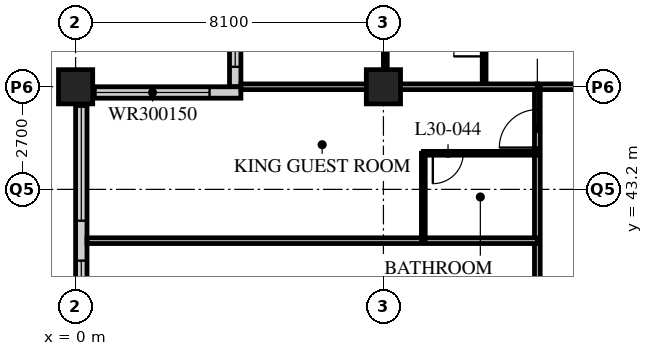
"""IFC4 building model, lengths in metres.
Left out: names, types, materials, properties, quantities, classifications, styles, units other than length and angle.
Written with IfcOpenShell. Run it as: python <this file> out.ifc"""

import sys

from ifc_helpers import new_model, si_unit, direction, frame, frame_2d, origin, origin_2d, place, context, subcontext, project, spatial, rectangle, hollow_rectangle, extrude, element, fill, save


model = new_model("IFC4")
c1 = context("Model", 3, precision=1e-05, world=origin(), true_north=direction((0.0, 1.0)))
c2 = subcontext(c1, "Body", "Model", "MODEL_VIEW")
j1 = project(units=[si_unit("LENGTHUNIT", "METRE"), si_unit("PLANEANGLEUNIT", "RADIAN")], contexts=[c1])
p1 = place(None, origin())
s1 = spatial("IfcSite", under=j1, at=p1, CompositionType="ELEMENT")
p2 = place(p1, origin())
s2 = spatial("IfcBuilding", under=s1, at=p2, CompositionType="ELEMENT")
p3 = place(p2, frame((0.0, 0.0, 120.4)))
s3 = spatial("IfcBuildingStorey", under=s2, at=p3, CompositionType="ELEMENT", Elevation=120.4)
for number, where, z_axis, x_axis in (
    (1, (0.0, 45.9, 0.0), (0.0, 0.0, 1.0), (1.0, 0.0, 0.0)),
    (2, (8.1, 45.9, 0.0), (0.0, 0.0, 1.0), (1.0, 0.0, 0.0)),
):
    element("IfcColumn", number, at=place(p3, frame(where, z_axis=z_axis, x_axis=x_axis)), inside=s3, PredefinedType="COLUMN", context=c2, shape_type="SweptSolid", body=[
        extrude(hollow_rectangle(XDim=0.9, YDim=0.9, WallThickness=0.09, at=origin_2d()), origin(), (0.0, 0.0, 1.0), 3.4),
    ])
p4 = place(p3, frame((4.2, 49.65, 0.0), z_axis=(0.0, 0.0, 1.0), x_axis=(0.0, -1.0, 0.0)))
e3 = element("IfcWall", 3, at=p4, inside=s3, PredefinedType="SOLIDWALL", context=c2, shape_type="SweptSolid", body=[
    extrude(rectangle(XDim=3.75, YDim=0.3, at=frame_2d((1.875, 0.0))), origin(), (0.0, 0.0, 1.0), 3.19),
])
p5 = place(p4, frame((0.225, 0.0, 0.9)))
e4 = element("IfcOpeningElement", 4, at=p5, cuts=e3, PredefinedType="OPENING", context=c2, shape_type="SweptSolid", body=[
    extrude(rectangle(XDim=3.0, YDim=1.5, at=frame_2d((1.5, 0.75))), frame((0.0, 0.16, 0.0), z_axis=(0.0, -1.0, 0.0), x_axis=(1.0, 0.0, 0.0)), (0.0, 0.0, 1.0), 0.32),
])
p6 = place(p3, frame((4.35, 45.75, 0.0), z_axis=(0.0, 0.0, 1.0), x_axis=(-1.0, 0.0, 0.0)))
e5 = element("IfcWall", 5, at=p6, inside=s3, PredefinedType="SOLIDWALL", context=c2, shape_type="SweptSolid", body=[
    extrude(rectangle(XDim=4.35, YDim=0.3, at=frame_2d((2.175, 0.0))), origin(), (0.0, 0.0, 1.0), 3.19),
])
p7 = place(p6, frame((0.825, 0.0, 0.9)))
e6 = element("IfcOpeningElement", 6, at=p7, cuts=e5, PredefinedType="OPENING", context=c2, shape_type="SweptSolid", body=[
    extrude(rectangle(XDim=3.0, YDim=1.5, at=frame_2d((1.5, 0.75))), frame((0.0, 0.16, 0.0), z_axis=(0.0, -1.0, 0.0), x_axis=(1.0, 0.0, 0.0)), (0.0, 0.0, 1.0), 0.32),
])
p8 = place(p3, frame((0.15, 45.6, 0.0), z_axis=(0.0, 0.0, 1.0), x_axis=(0.0, -1.0, 0.0)))
e7 = element("IfcWall", 7, at=p8, inside=s3, PredefinedType="SOLIDWALL", context=c2, shape_type="SweptSolid", body=[
    extrude(rectangle(XDim=32.1, YDim=0.3, at=frame_2d((16.05, 0.0))), origin(), (0.0, 0.0, 1.0), 3.19),
])
p9 = place(p8, frame((0.225, 0.0, 0.9)))
e8 = element("IfcOpeningElement", 8, at=p9, cuts=e7, PredefinedType="OPENING", context=c2, shape_type="SweptSolid", body=[
    extrude(rectangle(XDim=3.0, YDim=2.0, at=frame_2d((1.5, 1.0))), frame((0.0, 0.16, 0.0), z_axis=(0.0, -1.0, 0.0), x_axis=(1.0, 0.0, 0.0)), (0.0, 0.0, 1.0), 0.32),
])
p10 = place(p8, frame((4.275, 0.0, 0.9)))
e9 = element("IfcOpeningElement", 9, at=p10, cuts=e7, PredefinedType="OPENING", context=c2, shape_type="SweptSolid", body=[
    extrude(rectangle(XDim=3.0, YDim=2.0, at=frame_2d((1.5, 1.0))), frame((0.0, 0.16, 0.0), z_axis=(0.0, -1.0, 0.0), x_axis=(1.0, 0.0, 0.0)), (0.0, 0.0, 1.0), 0.32),
])
p11 = place(p8, frame((8.325, 0.0, 0.9)))
e10 = element("IfcOpeningElement", 10, at=p11, cuts=e7, PredefinedType="OPENING", context=c2, shape_type="SweptSolid", body=[
    extrude(rectangle(XDim=3.0, YDim=2.0, at=frame_2d((1.5, 1.0))), frame((0.0, 0.16, 0.0), z_axis=(0.0, -1.0, 0.0), x_axis=(1.0, 0.0, 0.0)), (0.0, 0.0, 1.0), 0.32),
])
p12 = place(p8, frame((12.375, 0.0, 0.9)))
e11 = element("IfcOpeningElement", 11, at=p12, cuts=e7, PredefinedType="OPENING", context=c2, shape_type="SweptSolid", body=[
    extrude(rectangle(XDim=3.0, YDim=2.0, at=frame_2d((1.5, 1.0))), frame((0.0, 0.16, 0.0), z_axis=(0.0, -1.0, 0.0), x_axis=(1.0, 0.0, 0.0)), (0.0, 0.0, 1.0), 0.32),
])
p13 = place(p8, frame((16.425, 0.0, 0.9)))
e12 = element("IfcOpeningElement", 12, at=p13, cuts=e7, PredefinedType="OPENING", context=c2, shape_type="SweptSolid", body=[
    extrude(rectangle(XDim=3.0, YDim=2.0, at=frame_2d((1.5, 1.0))), frame((0.0, 0.16, 0.0), z_axis=(0.0, -1.0, 0.0), x_axis=(1.0, 0.0, 0.0)), (0.0, 0.0, 1.0), 0.32),
])
p14 = place(p8, frame((20.475, 0.0, 0.9)))
e13 = element("IfcOpeningElement", 13, at=p14, cuts=e7, PredefinedType="OPENING", context=c2, shape_type="SweptSolid", body=[
    extrude(rectangle(XDim=3.0, YDim=2.0, at=frame_2d((1.5, 1.0))), frame((0.0, 0.16, 0.0), z_axis=(0.0, -1.0, 0.0), x_axis=(1.0, 0.0, 0.0)), (0.0, 0.0, 1.0), 0.32),
])
p15 = place(p8, frame((24.525, 0.0, 0.9)))
e14 = element("IfcOpeningElement", 14, at=p15, cuts=e7, PredefinedType="OPENING", context=c2, shape_type="SweptSolid", body=[
    extrude(rectangle(XDim=3.0, YDim=2.0, at=frame_2d((1.5, 1.0))), frame((0.0, 0.16, 0.0), z_axis=(0.0, -1.0, 0.0), x_axis=(1.0, 0.0, 0.0)), (0.0, 0.0, 1.0), 0.32),
])
p16 = place(p8, frame((28.575, 0.0, 0.9)))
e15 = element("IfcOpeningElement", 15, at=p16, cuts=e7, PredefinedType="OPENING", context=c2, shape_type="SweptSolid", body=[
    extrude(rectangle(XDim=3.0, YDim=2.0, at=frame_2d((1.5, 1.0))), frame((0.0, 0.16, 0.0), z_axis=(0.0, -1.0, 0.0), x_axis=(1.0, 0.0, 0.0)), (0.0, 0.0, 1.0), 0.32),
])
p17 = place(p3, frame((12.15, 45.9, 0.0), z_axis=(0.0, 0.0, 1.0), x_axis=(1.0, 0.0, 0.0)))
e16 = element("IfcWall", 16, at=p17, inside=s3, PredefinedType="PARTITIONING", context=c2, shape_type="SweptSolid", body=[
    extrude(rectangle(XDim=32.4, YDim=0.15, at=frame_2d((16.2, 0.0))), origin(), (0.0, 0.0, 1.0), 2.578),
])
p18 = place(p17, frame((5.95, 0.0, 0.0)))
e17 = element("IfcOpeningElement", 17, at=p18, cuts=e16, PredefinedType="OPENING", context=c2, shape_type="SweptSolid", body=[
    extrude(rectangle(XDim=1.0, YDim=2.1, at=frame_2d((0.5, 1.05))), frame((0.0, 0.085, 0.0), z_axis=(0.0, -1.0, 0.0), x_axis=(1.0, 0.0, 0.0)), (0.0, 0.0, 1.0), 0.17),
])
p19 = place(p17, frame((14.05, 0.0, 0.0)))
e18 = element("IfcOpeningElement", 18, at=p19, cuts=e16, PredefinedType="OPENING", context=c2, shape_type="SweptSolid", body=[
    extrude(rectangle(XDim=1.0, YDim=2.1, at=frame_2d((0.5, 1.05))), frame((0.0, 0.085, 0.0), z_axis=(0.0, -1.0, 0.0), x_axis=(1.0, 0.0, 0.0)), (0.0, 0.0, 1.0), 0.17),
])
p20 = place(p17, frame((25.7, 0.0, 0.0)))
e19 = element("IfcOpeningElement", 19, at=p20, cuts=e16, PredefinedType="OPENING", context=c2, shape_type="SweptSolid", body=[
    extrude(rectangle(XDim=1.0, YDim=2.1, at=frame_2d((0.5, 1.05))), frame((0.0, 0.085, 0.0), z_axis=(0.0, -1.0, 0.0), x_axis=(1.0, 0.0, 0.0)), (0.0, 0.0, 1.0), 0.17),
])
p21 = place(p17, frame((29.875, 0.0, 0.0)))
e20 = element("IfcOpeningElement", 20, at=p21, cuts=e16, PredefinedType="OPENING", context=c2, shape_type="SweptSolid", body=[
    extrude(rectangle(XDim=1.0, YDim=2.1, at=frame_2d((0.5, 1.05))), frame((0.0, 0.085, 0.0), z_axis=(0.0, -1.0, 0.0), x_axis=(1.0, 0.0, 0.0)), (0.0, 0.0, 1.0), 0.17),
])
p22 = place(p17, frame((1.525, 0.0, 0.0)))
e21 = element("IfcOpeningElement", 21, at=p22, cuts=e16, PredefinedType="OPENING", context=c2, shape_type="SweptSolid", body=[
    extrude(rectangle(XDim=1.0, YDim=2.1, at=frame_2d((0.5, 1.05))), frame((0.0, 0.085, 0.0), z_axis=(0.0, -1.0, 0.0), x_axis=(1.0, 0.0, 0.0)), (0.0, 0.0, 1.0), 0.17),
])
p23 = place(p3, frame((12.15, 17.55, 0.0), z_axis=(0.0, 0.0, 1.0), x_axis=(0.0, 1.0, 0.0)))
e22 = element("IfcWall", 22, at=p23, inside=s3, PredefinedType="PARTITIONING", context=c2, shape_type="SweptSolid", body=[
    extrude(rectangle(XDim=28.35, YDim=0.15, at=frame_2d((14.175, 0.0))), origin(), (0.0, 0.0, 1.0), 3.19),
])
p24 = place(p23, frame((5.45, 0.0, 0.0)))
e23 = element("IfcOpeningElement", 23, at=p24, cuts=e22, PredefinedType="OPENING", context=c2, shape_type="SweptSolid", body=[
    extrude(rectangle(XDim=1.0, YDim=2.1, at=frame_2d((0.5, 1.05))), frame((0.0, 0.085, 0.0), z_axis=(0.0, -1.0, 0.0), x_axis=(1.0, 0.0, 0.0)), (0.0, 0.0, 1.0), 0.17),
])
p25 = place(p23, frame((13.55, 0.0, 0.0)))
e24 = element("IfcOpeningElement", 24, at=p25, cuts=e22, PredefinedType="OPENING", context=c2, shape_type="SweptSolid", body=[
    extrude(rectangle(XDim=1.0, YDim=2.1, at=frame_2d((0.5, 1.05))), frame((0.0, 0.085, 0.0), z_axis=(0.0, -1.0, 0.0), x_axis=(1.0, 0.0, 0.0)), (0.0, 0.0, 1.0), 0.17),
])
p26 = place(p23, frame((21.65, 0.0, 0.0)))
e25 = element("IfcOpeningElement", 25, at=p26, cuts=e22, PredefinedType="OPENING", context=c2, shape_type="SweptSolid", body=[
    extrude(rectangle(XDim=1.0, YDim=2.1, at=frame_2d((0.5, 1.05))), frame((0.0, 0.085, 0.0), z_axis=(0.0, -1.0, 0.0), x_axis=(1.0, 0.0, 0.0)), (0.0, 0.0, 1.0), 0.17),
])
p27 = place(p23, frame((26.75, 0.0, 0.0)))
e26 = element("IfcOpeningElement", 26, at=p27, cuts=e22, PredefinedType="OPENING", context=c2, shape_type="SweptSolid", body=[
    extrude(rectangle(XDim=1.0, YDim=2.1, at=frame_2d((0.5, 1.05))), frame((0.0, 0.085, 0.0), z_axis=(0.0, -1.0, 0.0), x_axis=(1.0, 0.0, 0.0)), (0.0, 0.0, 1.0), 0.17),
])
p28 = place(p3, frame((12.15, 41.85, 0.0), z_axis=(0.0, 0.0, 1.0), x_axis=(-1.0, 0.0, 0.0)))
e27 = element("IfcWall", 27, at=p28, inside=s3, PredefinedType="PARTITIONING", context=c2, shape_type="SweptSolid", body=[
    extrude(rectangle(XDim=11.85, YDim=0.15, at=frame_2d((5.925, 0.0))), origin(), (0.0, 0.0, 1.0), 3.19),
])
p29 = place(p3, frame((9.15, 41.85, 0.0), z_axis=(0.0, 0.0, 1.0), x_axis=(0.0, 1.0, 0.0)))
e28 = element("IfcWall", 28, at=p29, inside=s3, PredefinedType="PARTITIONING", context=c2, shape_type="SweptSolid", body=[
    extrude(rectangle(XDim=2.3, YDim=0.1, at=frame_2d((1.15, 0.0))), origin(), (0.0, 0.0, 1.0), 3.19),
])
p30 = place(p3, frame((12.15, 44.15, 0.0), z_axis=(0.0, 0.0, 1.0), x_axis=(-1.0, 0.0, 0.0)))
e29 = element("IfcWall", 29, at=p30, inside=s3, PredefinedType="PARTITIONING", context=c2, shape_type="SweptSolid", body=[
    extrude(rectangle(XDim=3.0, YDim=0.1, at=frame_2d((1.5, 0.0))), origin(), (0.0, 0.0, 1.0), 3.19),
])
p31 = place(p30, frame((1.95, 0.0, 0.0)))
e30 = element("IfcOpeningElement", 30, at=p31, cuts=e29, PredefinedType="OPENING", context=c2, shape_type="SweptSolid", body=[
    extrude(rectangle(XDim=0.8, YDim=2.1, at=frame_2d((0.4, 1.05))), frame((0.0, 0.06, 0.0), z_axis=(0.0, -1.0, 0.0), x_axis=(1.0, 0.0, 0.0)), (0.0, 0.0, 1.0), 0.12),
])
p32 = place(p3, frame((10.75, 45.9, 0.0), z_axis=(0.0, 0.0, 1.0), x_axis=(0.0, 1.0, 0.0)))
e31 = element("IfcWall", 31, at=p32, inside=s3, PredefinedType="PARTITIONING", context=c2, shape_type="SweptSolid", body=[
    extrude(rectangle(XDim=2.4, YDim=0.1, at=frame_2d((1.2, 0.0))), origin(), (0.0, 0.0, 1.0), 3.19),
])
p33 = place(p32, frame((0.8, 0.0, 0.0)))
e32 = element("IfcOpeningElement", 32, at=p33, cuts=e31, PredefinedType="OPENING", context=c2, shape_type="SweptSolid", body=[
    extrude(rectangle(XDim=0.8, YDim=2.1, at=frame_2d((0.4, 1.05))), frame((0.0, 0.06, 0.0), z_axis=(0.0, -1.0, 0.0), x_axis=(1.0, 0.0, 0.0)), (0.0, 0.0, 1.0), 0.12),
])
p34 = place(p3, frame((8.15, 45.9, 0.0), z_axis=(0.0, 0.0, 1.0), x_axis=(0.0, 1.0, 0.0)))
e33 = element("IfcWall", 33, at=p34, inside=s3, PredefinedType="PARTITIONING", context=c2, shape_type="SweptSolid", body=[
    extrude(rectangle(XDim=2.4, YDim=0.1, at=frame_2d((1.2, 0.0))), origin(), (0.0, 0.0, 1.0), 2.578),
])
p35 = place(p3, frame((4.35, 45.9, 0.0), z_axis=(0.0, 0.0, 1.0), x_axis=(1.0, 0.0, 0.0)))
e34 = element("IfcWall", 34, at=p35, inside=s3, PredefinedType="PARTITIONING", context=c2, shape_type="SweptSolid", body=[
    extrude(rectangle(XDim=7.8, YDim=0.15, at=frame_2d((3.9, 0.0))), origin(), (0.0, 0.0, 1.0), 2.578),
])
p36 = place(p5, origin())
e35 = element("IfcWindow", 35, at=p36, inside=s3, PartitioningType="SINGLE_PANEL", PredefinedType="WINDOW", context=c2, shape_type="SweptSolid", body=[
    extrude(rectangle(XDim=3.0, YDim=1.5, at=frame_2d((1.5, 0.75))), frame((0.0, 0.03, 0.0), z_axis=(0.0, -1.0, 0.0), x_axis=(1.0, 0.0, 0.0)), (0.0, 0.0, 1.0), 0.06),
])
fill(e4, e35)
p37 = place(p7, origin())
e36 = element("IfcWindow", 36, at=p37, inside=s3, PartitioningType="SINGLE_PANEL", PredefinedType="WINDOW", context=c2, shape_type="SweptSolid", body=[
    extrude(rectangle(XDim=3.0, YDim=1.5, at=frame_2d((1.5, 0.75))), frame((0.0, 0.03, 0.0), z_axis=(0.0, -1.0, 0.0), x_axis=(1.0, 0.0, 0.0)), (0.0, 0.0, 1.0), 0.06),
])
fill(e6, e36)
p38 = place(p9, origin())
e37 = element("IfcWindow", 37, at=p38, inside=s3, PartitioningType="SINGLE_PANEL", PredefinedType="WINDOW", context=c2, shape_type="SweptSolid", body=[
    extrude(rectangle(XDim=3.0, YDim=2.0, at=frame_2d((1.5, 1.0))), frame((0.0, 0.03, 0.0), z_axis=(0.0, -1.0, 0.0), x_axis=(1.0, 0.0, 0.0)), (0.0, 0.0, 1.0), 0.06),
])
fill(e8, e37)
p39 = place(p10, origin())
e38 = element("IfcWindow", 38, at=p39, inside=s3, PartitioningType="SINGLE_PANEL", PredefinedType="WINDOW", context=c2, shape_type="SweptSolid", body=[
    extrude(rectangle(XDim=3.0, YDim=2.0, at=frame_2d((1.5, 1.0))), frame((0.0, 0.03, 0.0), z_axis=(0.0, -1.0, 0.0), x_axis=(1.0, 0.0, 0.0)), (0.0, 0.0, 1.0), 0.06),
])
fill(e9, e38)
p40 = place(p31, origin())
e39 = element("IfcDoor", 39, at=p40, inside=s3, OperationType="SINGLE_SWING_RIGHT", PredefinedType="DOOR", context=c2, shape_type="SweptSolid", body=[
    extrude(rectangle(XDim=0.8, YDim=2.1, at=frame_2d((0.4, 1.05))), frame((0.0, 0.025, 0.0), z_axis=(0.0, -1.0, 0.0), x_axis=(1.0, 0.0, 0.0)), (0.0, 0.0, 1.0), 0.05),
])
fill(e30, e39)
p41 = place(p27, origin())
e40 = element("IfcDoor", 40, at=p41, inside=s3, OperationType="SINGLE_SWING_LEFT", PredefinedType="DOOR", context=c2, shape_type="SweptSolid", body=[
    extrude(rectangle(XDim=1.0, YDim=2.1, at=frame_2d((0.5, 1.05))), frame((0.0, 0.025, 0.0), z_axis=(0.0, -1.0, 0.0), x_axis=(1.0, 0.0, 0.0)), (0.0, 0.0, 1.0), 0.05),
])
fill(e26, e40)
p42 = place(p33, origin())
e41 = element("IfcDoor", 41, at=p42, inside=s3, OperationType="SINGLE_SWING_LEFT", PredefinedType="DOOR", context=c2, shape_type="SweptSolid", body=[
    extrude(rectangle(XDim=0.8, YDim=2.1, at=frame_2d((0.4, 1.05))), frame((0.0, 0.025, 0.0), z_axis=(0.0, -1.0, 0.0), x_axis=(1.0, 0.0, 0.0)), (0.0, 0.0, 1.0), 0.05),
])
fill(e32, e41)
save(model, sys.argv[1])
